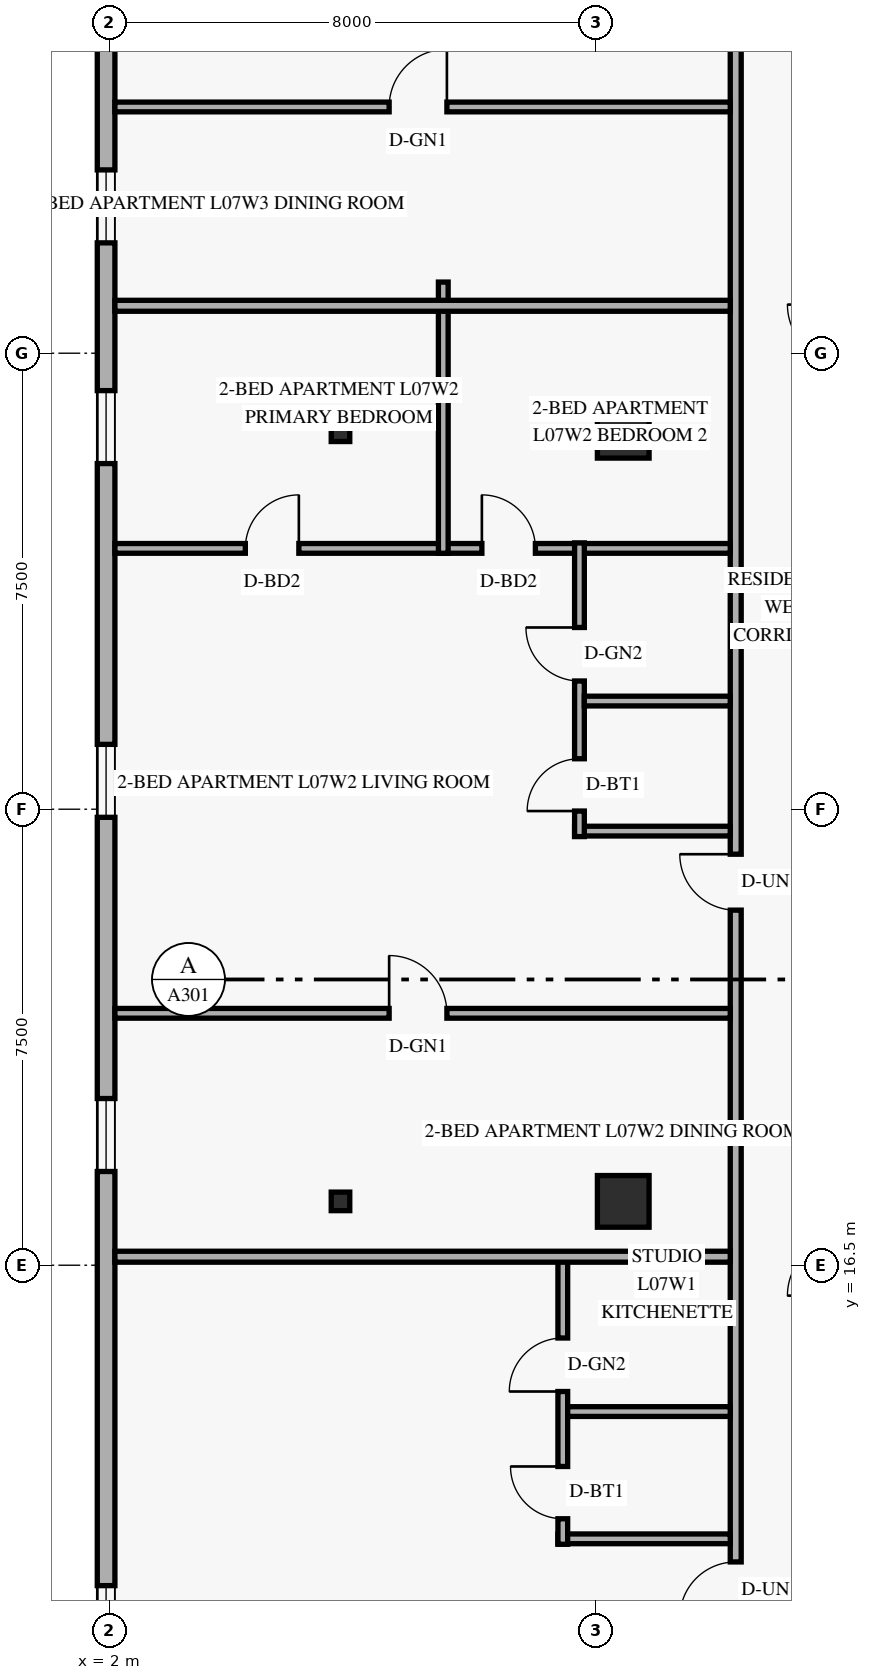
"""IFC4 building model, lengths in metres.
Left out: names, types, materials, properties, quantities, classifications, styles, units other than length and angle.
Written with IfcOpenShell. Run it as: python <this file> out.ifc"""

import sys

from ifc_helpers import new_model, si_unit, direction, frame, frame_2d, origin, origin_2d, place, context, subcontext, project, spatial, rectangle, hollow_rectangle, extrude, element, fill, save


model = new_model("IFC4")
c1 = context("Model", 3, precision=1e-05, world=origin(), true_north=direction((0.0, 1.0)))
c2 = subcontext(c1, "Body", "Model", "MODEL_VIEW")
j1 = project(units=[si_unit("LENGTHUNIT", "METRE"), si_unit("PLANEANGLEUNIT", "RADIAN")], contexts=[c1])
p1 = place(None, origin())
s1 = spatial("IfcSite", under=j1, at=p1, CompositionType="ELEMENT")
p2 = place(p1, origin())
s2 = spatial("IfcBuilding", under=s1, at=p2, CompositionType="ELEMENT")
p3 = place(p2, frame((0.0, 0.0, 31.2)))
s3 = spatial("IfcBuildingStorey", under=s2, at=p3, CompositionType="ELEMENT", Elevation=31.2)
for number, where, z_axis, x_axis in (
    (1, (5.8, 17.55, 0.0), (0.0, 0.0, 1.0), (1.0, 0.0, 0.0)),
    (2, (5.8, 30.2, 0.0), (0.0, 0.0, 1.0), (1.0, 0.0, 0.0)),
):
    element("IfcColumn", number, at=place(p3, frame(where, z_axis=z_axis, x_axis=x_axis)), inside=s3, PredefinedType="COLUMN", context=c2, shape_type="SweptSolid", body=[
        extrude(hollow_rectangle(XDim=0.305, YDim=0.305, WallThickness=0.013, at=origin_2d()), origin(), (0.0, 0.0, 1.0), 3.6),
    ])
for number, where, z_axis, x_axis in (
    (3, (10.45, 17.55, 0.0), (0.0, 0.0, 1.0), (1.0, 0.0, 0.0)),
    (4, (10.45, 30.2, 0.0), (0.0, 0.0, 1.0), (1.0, 0.0, 0.0)),
):
    element("IfcColumn", number, at=place(p3, frame(where, z_axis=z_axis, x_axis=x_axis)), inside=s3, PredefinedType="COLUMN", context=c2, shape_type="SweptSolid", body=[
        extrude(rectangle(XDim=0.85, YDim=0.85, at=origin_2d()), origin(), (0.0, 0.0, 1.0), 3.6),
    ])
p4 = place(p3, frame((1.945, 43.38, 0.0), z_axis=(0.0, 0.0, 1.0), x_axis=(0.0, -1.0, 0.0)))
e5 = element("IfcWall", 5, at=p4, inside=s3, PredefinedType="SOLIDWALL", context=c2, shape_type="SweptSolid", body=[
    extrude(rectangle(XDim=38.76, YDim=0.29, at=frame_2d((19.38, 0.0))), origin(), (0.0, 0.0, 1.0), 3.36),
])
p5 = place(p4, frame((32.15, 0.0, 0.85)))
e6 = element("IfcOpeningElement", 6, at=p5, cuts=e5, PredefinedType="OPENING", context=c2, shape_type="SweptSolid", body=[
    extrude(rectangle(XDim=1.2, YDim=1.5, at=frame_2d((0.6, 0.75))), frame((0.0, 0.155, 0.0), z_axis=(0.0, -1.0, 0.0), x_axis=(1.0, 0.0, 0.0)), (0.0, 0.0, 1.0), 0.31),
])
p6 = place(p4, frame((24.138, 0.0, 0.85)))
e7 = element("IfcOpeningElement", 7, at=p6, cuts=e5, PredefinedType="OPENING", context=c2, shape_type="SweptSolid", body=[
    extrude(rectangle(XDim=1.2, YDim=1.5, at=frame_2d((0.6, 0.75))), frame((0.0, 0.155, 0.0), z_axis=(0.0, -1.0, 0.0), x_axis=(1.0, 0.0, 0.0)), (0.0, 0.0, 1.0), 0.31),
])
p7 = place(p4, frame((18.313, 0.0, 0.85)))
e8 = element("IfcOpeningElement", 8, at=p7, cuts=e5, PredefinedType="OPENING", context=c2, shape_type="SweptSolid", body=[
    extrude(rectangle(XDim=1.2, YDim=1.5, at=frame_2d((0.6, 0.75))), frame((0.0, 0.155, 0.0), z_axis=(0.0, -1.0, 0.0), x_axis=(1.0, 0.0, 0.0)), (0.0, 0.0, 1.0), 0.31),
])
p8 = place(p4, frame((12.495, 0.0, 0.85)))
e9 = element("IfcOpeningElement", 9, at=p8, cuts=e5, PredefinedType="OPENING", context=c2, shape_type="SweptSolid", body=[
    extrude(rectangle(XDim=1.2, YDim=1.5, at=frame_2d((0.6, 0.75))), frame((0.0, 0.155, 0.0), z_axis=(0.0, -1.0, 0.0), x_axis=(1.0, 0.0, 0.0)), (0.0, 0.0, 1.0), 0.31),
])
p9 = place(p4, frame((8.865, 0.0, 0.85)))
e10 = element("IfcOpeningElement", 10, at=p9, cuts=e5, PredefinedType="OPENING", context=c2, shape_type="SweptSolid", body=[
    extrude(rectangle(XDim=1.2, YDim=1.5, at=frame_2d((0.6, 0.75))), frame((0.0, 0.155, 0.0), z_axis=(0.0, -1.0, 0.0), x_axis=(1.0, 0.0, 0.0)), (0.0, 0.0, 1.0), 0.31),
])
p10 = place(p4, frame((3.315, 0.0, 0.85)))
e11 = element("IfcOpeningElement", 11, at=p10, cuts=e5, PredefinedType="OPENING", context=c2, shape_type="SweptSolid", body=[
    extrude(rectangle(XDim=1.2, YDim=1.5, at=frame_2d((0.6, 0.75))), frame((0.0, 0.155, 0.0), z_axis=(0.0, -1.0, 0.0), x_axis=(1.0, 0.0, 0.0)), (0.0, 0.0, 1.0), 0.31),
])
p11 = place(p3, frame((12.3, 1.29, 0.0), z_axis=(0.0, 0.0, 1.0), x_axis=(0.0, 1.0, 0.0)))
e12 = element("IfcWall", 12, at=p11, inside=s3, PredefinedType="STANDARD", context=c2, shape_type="SweptSolid", body=[
    extrude(rectangle(XDim=45.42, YDim=0.18, at=frame_2d((22.71, 0.0))), origin(), (0.0, 0.0, 1.0), 2.649),
])
p12 = place(p11, frame((9.41, 0.0, 0.0)))
e13 = element("IfcOpeningElement", 13, at=p12, cuts=e12, PredefinedType="OPENING", context=c2, shape_type="SweptSolid", body=[
    extrude(rectangle(XDim=0.92, YDim=2.15, at=frame_2d((0.46, 1.075))), frame((0.0, 0.1, 0.0), z_axis=(0.0, -1.0, 0.0), x_axis=(1.0, 0.0, 0.0)), (0.0, 0.0, 1.0), 0.2),
])
p13 = place(p11, frame((21.05, 0.0, 0.0)))
e14 = element("IfcOpeningElement", 14, at=p13, cuts=e12, PredefinedType="OPENING", context=c2, shape_type="SweptSolid", body=[
    extrude(rectangle(XDim=0.92, YDim=2.15, at=frame_2d((0.46, 1.075))), frame((0.0, 0.1, 0.0), z_axis=(0.0, -1.0, 0.0), x_axis=(1.0, 0.0, 0.0)), (0.0, 0.0, 1.0), 0.2),
])
p14 = place(p11, frame((36.491, 0.0, 0.0)))
e15 = element("IfcOpeningElement", 15, at=p14, cuts=e12, PredefinedType="OPENING", context=c2, shape_type="SweptSolid", body=[
    extrude(rectangle(XDim=0.92, YDim=2.15, at=frame_2d((0.46, 1.075))), frame((0.0, 0.1, 0.0), z_axis=(0.0, -1.0, 0.0), x_axis=(1.0, 0.0, 0.0)), (0.0, 0.0, 1.0), 0.2),
])
p15 = place(p3, frame((9.376, 12.0, 0.0), z_axis=(0.0, 0.0, 1.0), x_axis=(1.0, 0.0, 0.0)))
e16 = element("IfcWall", 16, at=p15, inside=s3, PredefinedType="PLUMBINGWALL", context=c2, shape_type="SweptSolid", body=[
    extrude(rectangle(XDim=2.834, YDim=0.16, at=frame_2d((1.417, 0.0))), origin(), (0.0, 0.0, 1.0), 2.649),
])
p16 = place(p3, frame((9.456, 11.91, 0.0), z_axis=(0.0, 0.0, 1.0), x_axis=(0.0, 1.0, 0.0)))
e17 = element("IfcWall", 17, at=p16, inside=s3, PredefinedType="PLUMBINGWALL", context=c2, shape_type="SweptSolid", body=[
    extrude(rectangle(XDim=4.73, YDim=0.16, at=frame_2d((2.365, 0.0))), origin(), (0.0, 0.0, 1.0), 2.932),
])
p17 = place(p16, frame((0.42, 0.0, 0.0)))
e18 = element("IfcOpeningElement", 18, at=p17, cuts=e17, PredefinedType="OPENING", context=c2, shape_type="SweptSolid", body=[
    extrude(rectangle(XDim=0.86, YDim=2.12, at=frame_2d((0.43, 1.06))), frame((0.0, 0.09, 0.0), z_axis=(0.0, -1.0, 0.0), x_axis=(1.0, 0.0, 0.0)), (0.0, 0.0, 1.0), 0.18),
])
p18 = place(p16, frame((2.513, 0.0, 0.0)))
e19 = element("IfcOpeningElement", 19, at=p18, cuts=e17, PredefinedType="OPENING", context=c2, shape_type="SweptSolid", body=[
    extrude(rectangle(XDim=0.88, YDim=2.12, at=frame_2d((0.44, 1.06))), frame((0.0, 0.09, 0.0), z_axis=(0.0, -1.0, 0.0), x_axis=(1.0, 0.0, 0.0)), (0.0, 0.0, 1.0), 0.18),
])
p19 = place(p3, frame((9.536, 14.093, 0.0), z_axis=(0.0, 0.0, 1.0), x_axis=(1.0, 0.0, 0.0)))
e20 = element("IfcWall", 20, at=p19, inside=s3, PredefinedType="PLUMBINGWALL", context=c2, shape_type="SweptSolid", body=[
    extrude(rectangle(XDim=2.674, YDim=0.16, at=frame_2d((1.337, 0.0))), origin(), (0.0, 0.0, 1.0), 2.649),
])
p20 = place(p3, frame((2.09, 16.64, 0.0), z_axis=(0.0, 0.0, 1.0), x_axis=(1.0, 0.0, 0.0)))
e21 = element("IfcWall", 21, at=p20, inside=s3, PredefinedType="PARTITIONING", context=c2, shape_type="SweptSolid", body=[
    extrude(rectangle(XDim=10.12, YDim=0.18, at=frame_2d((5.06, 0.0))), origin(), (0.0, 0.0, 1.0), 2.649),
])
p21 = place(p3, frame((2.09, 28.29, 0.0), z_axis=(0.0, 0.0, 1.0), x_axis=(1.0, 0.0, 0.0)))
e22 = element("IfcWall", 22, at=p21, inside=s3, PredefinedType="PARTITIONING", context=c2, shape_type="SweptSolid", body=[
    extrude(rectangle(XDim=10.12, YDim=0.16, at=frame_2d((5.06, 0.0))), origin(), (0.0, 0.0, 1.0), 2.649),
])
p22 = place(p21, frame((2.145, 0.0, 0.0)))
e23 = element("IfcOpeningElement", 23, at=p22, cuts=e22, PredefinedType="OPENING", context=c2, shape_type="SweptSolid", body=[
    extrude(rectangle(XDim=0.88, YDim=2.14, at=frame_2d((0.44, 1.07))), frame((0.0, 0.09, 0.0), z_axis=(0.0, -1.0, 0.0), x_axis=(1.0, 0.0, 0.0)), (0.0, 0.0, 1.0), 0.18),
])
p23 = place(p21, frame((6.035, 0.0, 0.0)))
e24 = element("IfcOpeningElement", 24, at=p23, cuts=e22, PredefinedType="OPENING", context=c2, shape_type="SweptSolid", body=[
    extrude(rectangle(XDim=0.88, YDim=2.14, at=frame_2d((0.44, 1.07))), frame((0.0, 0.09, 0.0), z_axis=(0.0, -1.0, 0.0), x_axis=(1.0, 0.0, 0.0)), (0.0, 0.0, 1.0), 0.18),
])
p24 = place(p3, frame((9.65, 23.64, 0.0), z_axis=(0.0, 0.0, 1.0), x_axis=(1.0, 0.0, 0.0)))
e25 = element("IfcWall", 25, at=p24, inside=s3, PredefinedType="PLUMBINGWALL", context=c2, shape_type="SweptSolid", body=[
    extrude(rectangle(XDim=2.56, YDim=0.16, at=frame_2d((1.28, 0.0))), origin(), (0.0, 0.0, 1.0), 2.649),
])
p25 = place(p3, frame((9.73, 23.55, 0.0), z_axis=(0.0, 0.0, 1.0), x_axis=(0.0, 1.0, 0.0)))
e26 = element("IfcWall", 26, at=p25, inside=s3, PredefinedType="PLUMBINGWALL", context=c2, shape_type="SweptSolid", body=[
    extrude(rectangle(XDim=4.83, YDim=0.16, at=frame_2d((2.415, 0.0))), origin(), (0.0, 0.0, 1.0), 3.36),
])
p26 = place(p25, frame((0.42, 0.0, 0.0)))
e27 = element("IfcOpeningElement", 27, at=p26, cuts=e26, PredefinedType="OPENING", context=c2, shape_type="SweptSolid", body=[
    extrude(rectangle(XDim=0.86, YDim=2.12, at=frame_2d((0.43, 1.06))), frame((0.0, 0.09, 0.0), z_axis=(0.0, -1.0, 0.0), x_axis=(1.0, 0.0, 0.0)), (0.0, 0.0, 1.0), 0.18),
])
p27 = place(p25, frame((2.559, 0.0, 0.0)))
e28 = element("IfcOpeningElement", 28, at=p27, cuts=e26, PredefinedType="OPENING", context=c2, shape_type="SweptSolid", body=[
    extrude(rectangle(XDim=0.88, YDim=2.12, at=frame_2d((0.44, 1.06))), frame((0.0, 0.09, 0.0), z_axis=(0.0, -1.0, 0.0), x_axis=(1.0, 0.0, 0.0)), (0.0, 0.0, 1.0), 0.18),
])
p28 = place(p3, frame((9.81, 25.779, 0.0), z_axis=(0.0, 0.0, 1.0), x_axis=(1.0, 0.0, 0.0)))
e29 = element("IfcWall", 29, at=p28, inside=s3, PredefinedType="PLUMBINGWALL", context=c2, shape_type="SweptSolid", body=[
    extrude(rectangle(XDim=2.4, YDim=0.16, at=frame_2d((1.2, 0.0))), origin(), (0.0, 0.0, 1.0), 2.649),
])
p29 = place(p3, frame((2.09, 20.643, 0.0), z_axis=(0.0, 0.0, 1.0), x_axis=(1.0, 0.0, 0.0)))
e30 = element("IfcWall", 30, at=p29, inside=s3, PredefinedType="PARTITIONING", context=c2, shape_type="SweptSolid", body=[
    extrude(rectangle(XDim=10.12, YDim=0.16, at=frame_2d((5.06, 0.0))), origin(), (0.0, 0.0, 1.0), 2.649),
])
p30 = place(p29, frame((4.51, 0.0, 0.0)))
e31 = element("IfcOpeningElement", 31, at=p30, cuts=e30, PredefinedType="OPENING", context=c2, shape_type="SweptSolid", body=[
    extrude(rectangle(XDim=0.95, YDim=2.15, at=frame_2d((0.475, 1.075))), frame((0.0, 0.09, 0.0), z_axis=(0.0, -1.0, 0.0), x_axis=(1.0, 0.0, 0.0)), (0.0, 0.0, 1.0), 0.18),
])
p31 = place(p3, frame((7.49, 28.21, 0.0), z_axis=(0.0, 0.0, 1.0), x_axis=(0.0, 1.0, 0.0)))
e32 = element("IfcWall", 32, at=p31, inside=s3, PredefinedType="PARTITIONING", context=c2, shape_type="SweptSolid", body=[
    extrude(rectangle(XDim=4.46, YDim=0.16, at=frame_2d((2.23, 0.0))), origin(), (0.0, 0.0, 1.0), 2.649),
])
p32 = place(p3, frame((2.09, 32.28, 0.0), z_axis=(0.0, 0.0, 1.0), x_axis=(1.0, 0.0, 0.0)))
e33 = element("IfcWall", 33, at=p32, inside=s3, PredefinedType="PARTITIONING", context=c2, shape_type="SweptSolid", body=[
    extrude(rectangle(XDim=10.12, YDim=0.18, at=frame_2d((5.06, 0.0))), origin(), (0.0, 0.0, 1.0), 2.649),
])
p33 = place(p3, frame((2.09, 35.55, 0.0), z_axis=(0.0, 0.0, 1.0), x_axis=(1.0, 0.0, 0.0)))
e34 = element("IfcWall", 34, at=p33, inside=s3, PredefinedType="PARTITIONING", context=c2, shape_type="SweptSolid", body=[
    extrude(rectangle(XDim=10.12, YDim=0.16, at=frame_2d((5.06, 0.0))), origin(), (0.0, 0.0, 1.0), 2.649),
])
p34 = place(p33, frame((4.51, 0.0, 0.0)))
e35 = element("IfcOpeningElement", 35, at=p34, cuts=e34, PredefinedType="OPENING", context=c2, shape_type="SweptSolid", body=[
    extrude(rectangle(XDim=0.95, YDim=2.15, at=frame_2d((0.475, 1.075))), frame((0.0, 0.09, 0.0), z_axis=(0.0, -1.0, 0.0), x_axis=(1.0, 0.0, 0.0)), (0.0, 0.0, 1.0), 0.18),
])
p35 = place(p5, origin())
e36 = element("IfcWindow", 36, at=p35, inside=s3, PartitioningType="SINGLE_PANEL", PredefinedType="WINDOW", context=c2, shape_type="SweptSolid", body=[
    extrude(rectangle(XDim=1.2, YDim=1.5, at=frame_2d((0.6, 0.75))), frame((0.0, 0.03, 0.0), z_axis=(0.0, -1.0, 0.0), x_axis=(1.0, 0.0, 0.0)), (0.0, 0.0, 1.0), 0.06),
])
fill(e6, e36)
p36 = place(p6, origin())
e37 = element("IfcWindow", 37, at=p36, inside=s3, PartitioningType="SINGLE_PANEL", PredefinedType="WINDOW", context=c2, shape_type="SweptSolid", body=[
    extrude(rectangle(XDim=1.2, YDim=1.5, at=frame_2d((0.6, 0.75))), frame((0.0, 0.03, 0.0), z_axis=(0.0, -1.0, 0.0), x_axis=(1.0, 0.0, 0.0)), (0.0, 0.0, 1.0), 0.06),
])
fill(e7, e37)
p37 = place(p7, origin())
e38 = element("IfcWindow", 38, at=p37, inside=s3, PartitioningType="SINGLE_PANEL", PredefinedType="WINDOW", context=c2, shape_type="SweptSolid", body=[
    extrude(rectangle(XDim=1.2, YDim=1.5, at=frame_2d((0.6, 0.75))), frame((0.0, 0.03, 0.0), z_axis=(0.0, -1.0, 0.0), x_axis=(1.0, 0.0, 0.0)), (0.0, 0.0, 1.0), 0.06),
])
fill(e8, e38)
p38 = place(p8, origin())
e39 = element("IfcWindow", 39, at=p38, inside=s3, PartitioningType="SINGLE_PANEL", PredefinedType="WINDOW", context=c2, shape_type="SweptSolid", body=[
    extrude(rectangle(XDim=1.2, YDim=1.5, at=frame_2d((0.6, 0.75))), frame((0.0, 0.03, 0.0), z_axis=(0.0, -1.0, 0.0), x_axis=(1.0, 0.0, 0.0)), (0.0, 0.0, 1.0), 0.06),
])
fill(e9, e39)
p39 = place(p9, origin())
e40 = element("IfcWindow", 40, at=p39, inside=s3, PartitioningType="SINGLE_PANEL", PredefinedType="WINDOW", context=c2, shape_type="SweptSolid", body=[
    extrude(rectangle(XDim=1.2, YDim=1.5, at=frame_2d((0.6, 0.75))), frame((0.0, 0.03, 0.0), z_axis=(0.0, -1.0, 0.0), x_axis=(1.0, 0.0, 0.0)), (0.0, 0.0, 1.0), 0.06),
])
fill(e10, e40)
p40 = place(p12, origin())
e41 = element("IfcDoor", 41, at=p40, inside=s3, OperationType="SINGLE_SWING_LEFT", PredefinedType="DOOR", context=c2, shape_type="SweptSolid", body=[
    extrude(rectangle(XDim=0.92, YDim=2.15, at=frame_2d((0.46, 1.075))), frame((0.0, 0.025, 0.0), z_axis=(0.0, -1.0, 0.0), x_axis=(1.0, 0.0, 0.0)), (0.0, 0.0, 1.0), 0.05),
])
fill(e13, e41)
p41 = place(p17, origin())
e42 = element("IfcDoor", 42, at=p41, inside=s3, OperationType="SINGLE_SWING_RIGHT", PredefinedType="DOOR", context=c2, shape_type="SweptSolid", body=[
    extrude(rectangle(XDim=0.86, YDim=2.12, at=frame_2d((0.43, 1.06))), frame((0.0, 0.025, 0.0), z_axis=(0.0, -1.0, 0.0), x_axis=(1.0, 0.0, 0.0)), (0.0, 0.0, 1.0), 0.05),
])
fill(e18, e42)
p42 = place(p18, origin())
e43 = element("IfcDoor", 43, at=p42, inside=s3, OperationType="SINGLE_SWING_LEFT", PredefinedType="DOOR", context=c2, shape_type="SweptSolid", body=[
    extrude(rectangle(XDim=0.88, YDim=2.12, at=frame_2d((0.44, 1.06))), frame((0.0, 0.025, 0.0), z_axis=(0.0, -1.0, 0.0), x_axis=(1.0, 0.0, 0.0)), (0.0, 0.0, 1.0), 0.05),
])
fill(e19, e43)
p43 = place(p30, origin())
e44 = element("IfcDoor", 44, at=p43, inside=s3, OperationType="SINGLE_SWING_LEFT", PredefinedType="DOOR", context=c2, shape_type="SweptSolid", body=[
    extrude(rectangle(XDim=0.95, YDim=2.15, at=frame_2d((0.475, 1.075))), frame((0.0, 0.025, 0.0), z_axis=(0.0, -1.0, 0.0), x_axis=(1.0, 0.0, 0.0)), (0.0, 0.0, 1.0), 0.05),
])
fill(e31, e44)
p44 = place(p13, origin())
e45 = element("IfcDoor", 45, at=p44, inside=s3, OperationType="SINGLE_SWING_RIGHT", PredefinedType="DOOR", context=c2, shape_type="SweptSolid", body=[
    extrude(rectangle(XDim=0.92, YDim=2.15, at=frame_2d((0.46, 1.075))), frame((0.0, 0.025, 0.0), z_axis=(0.0, -1.0, 0.0), x_axis=(1.0, 0.0, 0.0)), (0.0, 0.0, 1.0), 0.05),
])
fill(e14, e45)
p45 = place(p26, origin())
e46 = element("IfcDoor", 46, at=p45, inside=s3, OperationType="SINGLE_SWING_LEFT", PredefinedType="DOOR", context=c2, shape_type="SweptSolid", body=[
    extrude(rectangle(XDim=0.86, YDim=2.12, at=frame_2d((0.43, 1.06))), frame((0.0, 0.025, 0.0), z_axis=(0.0, -1.0, 0.0), x_axis=(1.0, 0.0, 0.0)), (0.0, 0.0, 1.0), 0.05),
])
fill(e27, e46)
p46 = place(p27, origin())
e47 = element("IfcDoor", 47, at=p46, inside=s3, OperationType="SINGLE_SWING_RIGHT", PredefinedType="DOOR", context=c2, shape_type="SweptSolid", body=[
    extrude(rectangle(XDim=0.88, YDim=2.12, at=frame_2d((0.44, 1.06))), frame((0.0, 0.025, 0.0), z_axis=(0.0, -1.0, 0.0), x_axis=(1.0, 0.0, 0.0)), (0.0, 0.0, 1.0), 0.05),
])
fill(e28, e47)
p47 = place(p22, origin())
e48 = element("IfcDoor", 48, at=p47, inside=s3, OperationType="SINGLE_SWING_RIGHT", PredefinedType="DOOR", context=c2, shape_type="SweptSolid", body=[
    extrude(rectangle(XDim=0.88, YDim=2.14, at=frame_2d((0.44, 1.07))), frame((0.0, 0.025, 0.0), z_axis=(0.0, -1.0, 0.0), x_axis=(1.0, 0.0, 0.0)), (0.0, 0.0, 1.0), 0.05),
])
fill(e23, e48)
p48 = place(p23, origin())
e49 = element("IfcDoor", 49, at=p48, inside=s3, OperationType="SINGLE_SWING_LEFT", PredefinedType="DOOR", context=c2, shape_type="SweptSolid", body=[
    extrude(rectangle(XDim=0.88, YDim=2.14, at=frame_2d((0.44, 1.07))), frame((0.0, 0.025, 0.0), z_axis=(0.0, -1.0, 0.0), x_axis=(1.0, 0.0, 0.0)), (0.0, 0.0, 1.0), 0.05),
])
fill(e24, e49)
p49 = place(p34, origin())
e50 = element("IfcDoor", 50, at=p49, inside=s3, OperationType="SINGLE_SWING_RIGHT", PredefinedType="DOOR", context=c2, shape_type="SweptSolid", body=[
    extrude(rectangle(XDim=0.95, YDim=2.15, at=frame_2d((0.475, 1.075))), frame((0.0, 0.025, 0.0), z_axis=(0.0, -1.0, 0.0), x_axis=(1.0, 0.0, 0.0)), (0.0, 0.0, 1.0), 0.05),
])
fill(e35, e50)
save(model, sys.argv[1])
